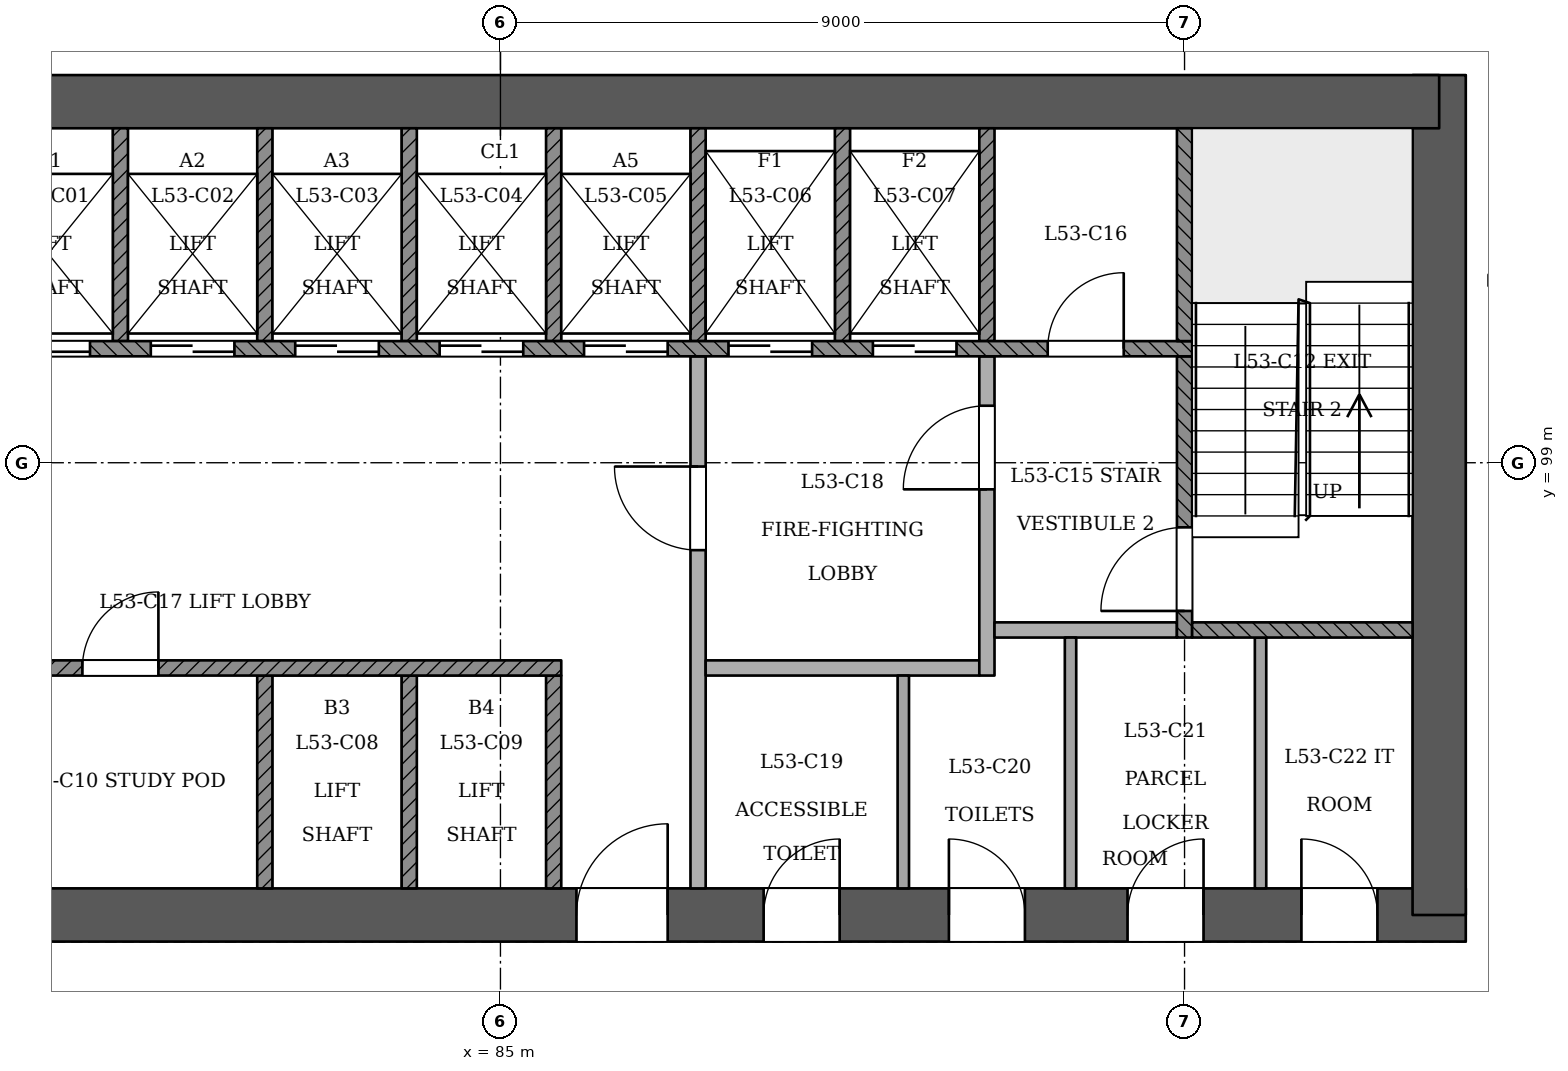
"""IFC4 building model, lengths in metres.
Left out: names, types, materials, properties, quantities, classifications, styles, units other than length and angle.
Written with IfcOpenShell. Run it as: python <this file> out.ifc"""

import sys

from ifc_helpers import new_model, si_unit, direction, frame, frame_2d, origin, place, context, subcontext, project, spatial, rectangle, extrude, element, fill, save


model = new_model("IFC4")
c1 = context("Model", 3, precision=1e-05, world=origin(), true_north=direction((0.0, 1.0)))
c2 = subcontext(c1, "Body", "Model", "MODEL_VIEW")
j1 = project(units=[si_unit("LENGTHUNIT", "METRE"), si_unit("PLANEANGLEUNIT", "RADIAN")], contexts=[c1])
p1 = place(None, origin())
s1 = spatial("IfcSite", under=j1, at=p1, CompositionType="ELEMENT")
p2 = place(p1, origin())
s2 = spatial("IfcBuilding", under=s1, at=p2, CompositionType="ELEMENT")
p3 = place(p2, frame((0.0, 0.0, 205.2)))
s3 = spatial("IfcBuildingStorey", under=s2, at=p3, CompositionType="ELEMENT", Elevation=205.2)
p4 = place(p3, frame((72.65, 93.05, 0.0), z_axis=(0.0, 0.0, 1.0), x_axis=(1.0, 0.0, 0.0)))
e1 = element("IfcWall", 1, at=p4, inside=s3, PredefinedType="SHEAR", context=c2, shape_type="SweptSolid", body=[
    extrude(rectangle(XDim=25.05, YDim=0.7, at=frame_2d((12.525, 0.0))), origin(), (0.0, 0.0, 1.0), 3.6),
])
p5 = place(p4, frame((1.15, 0.0, 0.0)))
e2 = element("IfcOpeningElement", 2, at=p5, cuts=e1, PredefinedType="OPENING", context=c2, shape_type="SweptSolid", body=[
    extrude(rectangle(XDim=1.2, YDim=2.1, at=frame_2d((0.6, 1.05))), frame((0.0, 0.36, 0.0), z_axis=(0.0, -1.0, 0.0), x_axis=(1.0, 0.0, 0.0)), (0.0, 0.0, 1.0), 0.721),
])
p6 = place(p4, frame((3.35, 0.0, 0.0)))
e3 = element("IfcOpeningElement", 3, at=p6, cuts=e1, PredefinedType="OPENING", context=c2, shape_type="SweptSolid", body=[
    extrude(rectangle(XDim=1.2, YDim=2.1, at=frame_2d((0.6, 1.05))), frame((0.0, 0.36, 0.0), z_axis=(0.0, -1.0, 0.0), x_axis=(1.0, 0.0, 0.0)), (0.0, 0.0, 1.0), 0.721),
])
p7 = place(p4, frame((13.35, 0.0, 0.0)))
e4 = element("IfcOpeningElement", 4, at=p7, cuts=e1, PredefinedType="OPENING", context=c2, shape_type="SweptSolid", body=[
    extrude(rectangle(XDim=1.2, YDim=2.1, at=frame_2d((0.6, 1.05))), frame((0.0, 0.36, 0.0), z_axis=(0.0, -1.0, 0.0), x_axis=(1.0, 0.0, 0.0)), (0.0, 0.0, 1.0), 0.721),
])
p8 = place(p4, frame((15.812, 0.0, 0.0)))
e5 = element("IfcOpeningElement", 5, at=p8, cuts=e1, PredefinedType="OPENING", context=c2, shape_type="SweptSolid", body=[
    extrude(rectangle(XDim=1.0, YDim=2.1, at=frame_2d((0.5, 1.05))), frame((0.0, 0.36, 0.0), z_axis=(0.0, -1.0, 0.0), x_axis=(1.0, 0.0, 0.0)), (0.0, 0.0, 1.0), 0.721),
])
p9 = place(p4, frame((18.25, 0.0, 0.0)))
e6 = element("IfcOpeningElement", 6, at=p9, cuts=e1, PredefinedType="OPENING", context=c2, shape_type="SweptSolid", body=[
    extrude(rectangle(XDim=1.0, YDim=2.1, at=frame_2d((0.5, 1.05))), frame((0.0, 0.36, 0.0), z_axis=(0.0, -1.0, 0.0), x_axis=(1.0, 0.0, 0.0)), (0.0, 0.0, 1.0), 0.721),
])
p10 = place(p4, frame((20.6, 0.0, 0.0)))
e7 = element("IfcOpeningElement", 7, at=p10, cuts=e1, PredefinedType="OPENING", context=c2, shape_type="SweptSolid", body=[
    extrude(rectangle(XDim=1.0, YDim=2.1, at=frame_2d((0.5, 1.05))), frame((0.0, 0.36, 0.0), z_axis=(0.0, -1.0, 0.0), x_axis=(1.0, 0.0, 0.0)), (0.0, 0.0, 1.0), 0.721),
])
p11 = place(p4, frame((22.887, 0.0, 0.0)))
e8 = element("IfcOpeningElement", 8, at=p11, cuts=e1, PredefinedType="OPENING", context=c2, shape_type="SweptSolid", body=[
    extrude(rectangle(XDim=1.0, YDim=2.1, at=frame_2d((0.5, 1.05))), frame((0.0, 0.36, 0.0), z_axis=(0.0, -1.0, 0.0), x_axis=(1.0, 0.0, 0.0)), (0.0, 0.0, 1.0), 0.721),
])
p12 = place(p3, frame((97.35, 93.05, 0.0), z_axis=(0.0, 0.0, 1.0), x_axis=(0.0, 1.0, 0.0)))
e9 = element("IfcWall", 9, at=p12, inside=s3, PredefinedType="SHEAR", context=c2, shape_type="SweptSolid", body=[
    extrude(rectangle(XDim=11.05, YDim=0.7, at=frame_2d((5.525, 0.0))), origin(), (0.0, 0.0, 1.0), 3.6),
])
p13 = place(p3, frame((97.35, 103.75, 0.0), z_axis=(0.0, 0.0, 1.0), x_axis=(-1.0, 0.0, 0.0)))
e10 = element("IfcWall", 10, at=p13, inside=s3, PredefinedType="SHEAR", context=c2, shape_type="SweptSolid", body=[
    extrude(rectangle(XDim=25.05, YDim=0.7, at=frame_2d((12.525, 0.0))), origin(), (0.0, 0.0, 1.0), 3.6),
])
for number, where, z_axis, x_axis in (
    (11, (81.9, 93.4, 0.0), (0.0, 0.0, 1.0), (0.0, 1.0, 0.0)),
    (12, (83.8, 93.4, 0.0), (0.0, 0.0, 1.0), (0.0, 1.0, 0.0)),
    (13, (85.7, 93.4, 0.0), (0.0, 0.0, 1.0), (0.0, 1.0, 0.0)),
):
    element("IfcWall", number, at=place(p3, frame(where, z_axis=z_axis, x_axis=x_axis)), inside=s3, PredefinedType="SOLIDWALL", context=c2, shape_type="SweptSolid", body=[
        extrude(rectangle(XDim=2.8, YDim=0.2, at=frame_2d((1.4, 0.0))), origin(), (0.0, 0.0, 1.0), 3.15),
    ])
p14 = place(p3, frame((87.6, 93.4, 0.0), z_axis=(0.0, 0.0, 1.0), x_axis=(0.0, 1.0, 0.0)))
e14 = element("IfcWall", 14, at=p14, inside=s3, PredefinedType="PARTITIONING", context=c2, shape_type="SweptSolid", body=[
    extrude(rectangle(XDim=7.0, YDim=0.2, at=frame_2d((3.5, 0.0))), origin(), (0.0, 0.0, 1.0), 3.15),
])
p15 = place(p14, frame((4.45, 0.0, 0.0)))
e15 = element("IfcOpeningElement", 15, at=p15, cuts=e14, PredefinedType="OPENING", context=c2, shape_type="SweptSolid", body=[
    extrude(rectangle(XDim=1.1, YDim=2.1, at=frame_2d((0.55, 1.05))), frame((0.0, 0.11, 0.0), z_axis=(0.0, -1.0, 0.0), x_axis=(1.0, 0.0, 0.0)), (0.0, 0.0, 1.0), 0.221),
])
p16 = place(p3, frame((90.3, 93.4, 0.0), z_axis=(0.0, 0.0, 1.0), x_axis=(0.0, 1.0, 0.0)))
e16 = element("IfcWall", 16, at=p16, inside=s3, PredefinedType="PARTITIONING", context=c2, shape_type="SweptSolid", body=[
    extrude(rectangle(XDim=2.8, YDim=0.15, at=frame_2d((1.4, 0.0))), origin(), (0.0, 0.0, 1.0), 3.15),
])
for number, where, z_axis, x_axis in (
    (17, (92.5, 93.4, 0.0), (0.0, 0.0, 1.0), (0.0, 1.0, 0.0)),
    (18, (95.0, 93.4, 0.0), (0.0, 0.0, 1.0), (0.0, 1.0, 0.0)),
):
    element("IfcWall", number, at=place(p3, frame(where, z_axis=z_axis, x_axis=x_axis)), inside=s3, PredefinedType="PARTITIONING", context=c2, shape_type="SweptSolid", body=[
        extrude(rectangle(XDim=3.3, YDim=0.15, at=frame_2d((1.65, 0.0))), origin(), (0.0, 0.0, 1.0), 3.15),
    ])
p17 = place(p3, frame((78.0, 96.3, 0.0), z_axis=(0.0, 0.0, 1.0), x_axis=(1.0, 0.0, 0.0)))
e19 = element("IfcWall", 19, at=p17, inside=s3, PredefinedType="SOLIDWALL", context=c2, shape_type="SweptSolid", body=[
    extrude(rectangle(XDim=7.8, YDim=0.2, at=frame_2d((3.9, 0.0))), origin(), (0.0, 0.0, 1.0), 3.15),
])
p18 = place(p17, frame((1.5, 0.0, 0.0)))
e20 = element("IfcOpeningElement", 20, at=p18, cuts=e19, PredefinedType="OPENING", context=c2, shape_type="SweptSolid", body=[
    extrude(rectangle(XDim=1.0, YDim=2.1, at=frame_2d((0.5, 1.05))), frame((0.0, 0.11, 0.0), z_axis=(0.0, -1.0, 0.0), x_axis=(1.0, 0.0, 0.0)), (0.0, 0.0, 1.0), 0.221),
])
p19 = place(p3, frame((87.7, 96.3, 0.0), z_axis=(0.0, 0.0, 1.0), x_axis=(1.0, 0.0, 0.0)))
e21 = element("IfcWall", 21, at=p19, inside=s3, PredefinedType="PARTITIONING", context=c2, shape_type="SweptSolid", body=[
    extrude(rectangle(XDim=3.6, YDim=0.2, at=frame_2d((1.8, 0.0))), origin(), (0.0, 0.0, 1.0), 3.15),
])
p20 = place(p3, frame((91.4, 96.2, 0.0), z_axis=(0.0, 0.0, 1.0), x_axis=(0.0, 1.0, 0.0)))
e22 = element("IfcWall", 22, at=p20, inside=s3, PredefinedType="PARTITIONING", context=c2, shape_type="SweptSolid", body=[
    extrude(rectangle(XDim=4.2, YDim=0.2, at=frame_2d((2.1, 0.0))), origin(), (0.0, 0.0, 1.0), 3.15),
])
p21 = place(p20, frame((2.45, 0.0, 0.0)))
e23 = element("IfcOpeningElement", 23, at=p21, cuts=e22, PredefinedType="OPENING", context=c2, shape_type="SweptSolid", body=[
    extrude(rectangle(XDim=1.1, YDim=2.1, at=frame_2d((0.55, 1.05))), frame((0.0, 0.11, 0.0), z_axis=(0.0, -1.0, 0.0), x_axis=(1.0, 0.0, 0.0)), (0.0, 0.0, 1.0), 0.221),
])
p22 = place(p3, frame((91.5, 96.8, 0.0), z_axis=(0.0, 0.0, 1.0), x_axis=(1.0, 0.0, 0.0)))
e24 = element("IfcWall", 24, at=p22, inside=s3, PredefinedType="PARTITIONING", context=c2, shape_type="SweptSolid", body=[
    extrude(rectangle(XDim=2.4, YDim=0.2, at=frame_2d((1.2, 0.0))), origin(), (0.0, 0.0, 1.0), 3.15),
])
p23 = place(p3, frame((94.0, 96.7, 0.0), z_axis=(0.0, 0.0, 1.0), x_axis=(0.0, 1.0, 0.0)))
e25 = element("IfcWall", 25, at=p23, inside=s3, PredefinedType="SOLIDWALL", context=c2, shape_type="SweptSolid", body=[
    extrude(rectangle(XDim=3.7, YDim=0.2, at=frame_2d((1.85, 0.0))), origin(), (0.0, 0.0, 1.0), 3.15),
])
p24 = place(p23, frame((0.35, 0.0, 0.0)))
e26 = element("IfcOpeningElement", 26, at=p24, cuts=e25, PredefinedType="OPENING", context=c2, shape_type="SweptSolid", body=[
    extrude(rectangle(XDim=1.1, YDim=2.1, at=frame_2d((0.55, 1.05))), frame((0.0, 0.11, 0.0), z_axis=(0.0, -1.0, 0.0), x_axis=(1.0, 0.0, 0.0)), (0.0, 0.0, 1.0), 0.221),
])
p25 = place(p3, frame((94.1, 96.8, 0.0), z_axis=(0.0, 0.0, 1.0), x_axis=(1.0, 0.0, 0.0)))
e27 = element("IfcWall", 27, at=p25, inside=s3, PredefinedType="SOLIDWALL", context=c2, shape_type="SweptSolid", body=[
    extrude(rectangle(XDim=2.9, YDim=0.2, at=frame_2d((1.45, 0.0))), origin(), (0.0, 0.0, 1.0), 3.15),
])
p26 = place(p3, frame((75.9, 100.5, 0.0), z_axis=(0.0, 0.0, 1.0), x_axis=(1.0, 0.0, 0.0)))
e28 = element("IfcWall", 28, at=p26, inside=s3, PredefinedType="SOLIDWALL", context=c2, shape_type="SweptSolid", body=[
    extrude(rectangle(XDim=18.2, YDim=0.2, at=frame_2d((9.1, 0.0))), origin(), (0.0, 0.0, 1.0), 3.15),
])
p27 = place(p26, frame((2.6, 0.0, 0.0)))
e29 = element("IfcOpeningElement", 29, at=p27, cuts=e28, PredefinedType="OPENING", context=c2, shape_type="SweptSolid", body=[
    extrude(rectangle(XDim=1.1, YDim=2.1, at=frame_2d((0.55, 1.05))), frame((0.0, 0.11, 0.0), z_axis=(0.0, -1.0, 0.0), x_axis=(1.0, 0.0, 0.0)), (0.0, 0.0, 1.0), 0.221),
])
p28 = place(p26, frame((4.5, 0.0, 0.0)))
e30 = element("IfcOpeningElement", 30, at=p28, cuts=e28, PredefinedType="OPENING", context=c2, shape_type="SweptSolid", body=[
    extrude(rectangle(XDim=1.1, YDim=2.1, at=frame_2d((0.55, 1.05))), frame((0.0, 0.11, 0.0), z_axis=(0.0, -1.0, 0.0), x_axis=(1.0, 0.0, 0.0)), (0.0, 0.0, 1.0), 0.221),
])
p29 = place(p26, frame((6.4, 0.0, 0.0)))
e31 = element("IfcOpeningElement", 31, at=p29, cuts=e28, PredefinedType="OPENING", context=c2, shape_type="SweptSolid", body=[
    extrude(rectangle(XDim=1.1, YDim=2.1, at=frame_2d((0.55, 1.05))), frame((0.0, 0.11, 0.0), z_axis=(0.0, -1.0, 0.0), x_axis=(1.0, 0.0, 0.0)), (0.0, 0.0, 1.0), 0.221),
])
p30 = place(p26, frame((8.3, 0.0, 0.0)))
e32 = element("IfcOpeningElement", 32, at=p30, cuts=e28, PredefinedType="OPENING", context=c2, shape_type="SweptSolid", body=[
    extrude(rectangle(XDim=1.1, YDim=2.1, at=frame_2d((0.55, 1.05))), frame((0.0, 0.11, 0.0), z_axis=(0.0, -1.0, 0.0), x_axis=(1.0, 0.0, 0.0)), (0.0, 0.0, 1.0), 0.221),
])
p31 = place(p26, frame((10.2, 0.0, 0.0)))
e33 = element("IfcOpeningElement", 33, at=p31, cuts=e28, PredefinedType="OPENING", context=c2, shape_type="SweptSolid", body=[
    extrude(rectangle(XDim=1.1, YDim=2.1, at=frame_2d((0.55, 1.05))), frame((0.0, 0.11, 0.0), z_axis=(0.0, -1.0, 0.0), x_axis=(1.0, 0.0, 0.0)), (0.0, 0.0, 1.0), 0.221),
])
p32 = place(p26, frame((12.1, 0.0, 0.0)))
e34 = element("IfcOpeningElement", 34, at=p32, cuts=e28, PredefinedType="OPENING", context=c2, shape_type="SweptSolid", body=[
    extrude(rectangle(XDim=1.1, YDim=2.1, at=frame_2d((0.55, 1.05))), frame((0.0, 0.11, 0.0), z_axis=(0.0, -1.0, 0.0), x_axis=(1.0, 0.0, 0.0)), (0.0, 0.0, 1.0), 0.221),
])
p33 = place(p26, frame((14.0, 0.0, 0.0)))
e35 = element("IfcOpeningElement", 35, at=p33, cuts=e28, PredefinedType="OPENING", context=c2, shape_type="SweptSolid", body=[
    extrude(rectangle(XDim=1.1, YDim=2.1, at=frame_2d((0.55, 1.05))), frame((0.0, 0.11, 0.0), z_axis=(0.0, -1.0, 0.0), x_axis=(1.0, 0.0, 0.0)), (0.0, 0.0, 1.0), 0.221),
])
p34 = place(p26, frame((0.65, 0.0, 0.0)))
e36 = element("IfcOpeningElement", 36, at=p34, cuts=e28, PredefinedType="OPENING", context=c2, shape_type="SweptSolid", body=[
    extrude(rectangle(XDim=1.0, YDim=2.1, at=frame_2d((0.5, 1.05))), frame((0.0, 0.11, 0.0), z_axis=(0.0, -1.0, 0.0), x_axis=(1.0, 0.0, 0.0)), (0.0, 0.0, 1.0), 0.221),
])
p35 = place(p26, frame((16.3, 0.0, 0.0)))
e37 = element("IfcOpeningElement", 37, at=p35, cuts=e28, PredefinedType="OPENING", context=c2, shape_type="SweptSolid", body=[
    extrude(rectangle(XDim=1.0, YDim=2.1, at=frame_2d((0.5, 1.05))), frame((0.0, 0.11, 0.0), z_axis=(0.0, -1.0, 0.0), x_axis=(1.0, 0.0, 0.0)), (0.0, 0.0, 1.0), 0.221),
])
for number, where, z_axis, x_axis in (
    (38, (80.0, 100.6, 0.0), (0.0, 0.0, 1.0), (0.0, 1.0, 0.0)),
    (39, (81.9, 100.6, 0.0), (0.0, 0.0, 1.0), (0.0, 1.0, 0.0)),
    (40, (83.8, 100.6, 0.0), (0.0, 0.0, 1.0), (0.0, 1.0, 0.0)),
    (41, (85.7, 100.6, 0.0), (0.0, 0.0, 1.0), (0.0, 1.0, 0.0)),
    (42, (87.6, 100.6, 0.0), (0.0, 0.0, 1.0), (0.0, 1.0, 0.0)),
    (43, (89.5, 100.6, 0.0), (0.0, 0.0, 1.0), (0.0, 1.0, 0.0)),
    (44, (91.4, 100.6, 0.0), (0.0, 0.0, 1.0), (0.0, 1.0, 0.0)),
    (45, (94.0, 100.6, 0.0), (0.0, 0.0, 1.0), (0.0, 1.0, 0.0)),
):
    element("IfcWall", number, at=place(p3, frame(where, z_axis=z_axis, x_axis=x_axis)), inside=s3, PredefinedType="SOLIDWALL", context=c2, shape_type="SweptSolid", body=[
        extrude(rectangle(XDim=2.8, YDim=0.2, at=frame_2d((1.4, 0.0))), origin(), (0.0, 0.0, 1.0), 3.15),
    ])
p36 = place(p27, origin())
e46 = element("IfcDoor", 46, at=p36, inside=s3, OperationType="SLIDING_TO_RIGHT", PredefinedType="NOTDEFINED", context=c2, shape_type="SweptSolid", body=[
    extrude(rectangle(XDim=1.1, YDim=2.1, at=frame_2d((0.55, 1.05))), frame((0.0, 0.025, 0.0), z_axis=(0.0, -1.0, 0.0), x_axis=(1.0, 0.0, 0.0)), (0.0, 0.0, 1.0), 0.05),
])
fill(e29, e46)
p37 = place(p28, origin())
e47 = element("IfcDoor", 47, at=p37, inside=s3, OperationType="SLIDING_TO_LEFT", PredefinedType="NOTDEFINED", context=c2, shape_type="SweptSolid", body=[
    extrude(rectangle(XDim=1.1, YDim=2.1, at=frame_2d((0.55, 1.05))), frame((0.0, 0.025, 0.0), z_axis=(0.0, -1.0, 0.0), x_axis=(1.0, 0.0, 0.0)), (0.0, 0.0, 1.0), 0.05),
])
fill(e30, e47)
p38 = place(p29, origin())
e48 = element("IfcDoor", 48, at=p38, inside=s3, OperationType="SLIDING_TO_RIGHT", PredefinedType="NOTDEFINED", context=c2, shape_type="SweptSolid", body=[
    extrude(rectangle(XDim=1.1, YDim=2.1, at=frame_2d((0.55, 1.05))), frame((0.0, 0.025, 0.0), z_axis=(0.0, -1.0, 0.0), x_axis=(1.0, 0.0, 0.0)), (0.0, 0.0, 1.0), 0.05),
])
fill(e31, e48)
p39 = place(p30, origin())
e49 = element("IfcDoor", 49, at=p39, inside=s3, OperationType="SLIDING_TO_LEFT", PredefinedType="NOTDEFINED", context=c2, shape_type="SweptSolid", body=[
    extrude(rectangle(XDim=1.1, YDim=2.1, at=frame_2d((0.55, 1.05))), frame((0.0, 0.025, 0.0), z_axis=(0.0, -1.0, 0.0), x_axis=(1.0, 0.0, 0.0)), (0.0, 0.0, 1.0), 0.05),
])
fill(e32, e49)
p40 = place(p31, origin())
e50 = element("IfcDoor", 50, at=p40, inside=s3, OperationType="SLIDING_TO_RIGHT", PredefinedType="NOTDEFINED", context=c2, shape_type="SweptSolid", body=[
    extrude(rectangle(XDim=1.1, YDim=2.1, at=frame_2d((0.55, 1.05))), frame((0.0, 0.025, 0.0), z_axis=(0.0, -1.0, 0.0), x_axis=(1.0, 0.0, 0.0)), (0.0, 0.0, 1.0), 0.05),
])
fill(e33, e50)
p41 = place(p32, origin())
e51 = element("IfcDoor", 51, at=p41, inside=s3, OperationType="SLIDING_TO_RIGHT", PredefinedType="NOTDEFINED", context=c2, shape_type="SweptSolid", body=[
    extrude(rectangle(XDim=1.1, YDim=2.1, at=frame_2d((0.55, 1.05))), frame((0.0, 0.025, 0.0), z_axis=(0.0, -1.0, 0.0), x_axis=(1.0, 0.0, 0.0)), (0.0, 0.0, 1.0), 0.05),
])
fill(e34, e51)
p42 = place(p33, origin())
e52 = element("IfcDoor", 52, at=p42, inside=s3, OperationType="SLIDING_TO_LEFT", PredefinedType="NOTDEFINED", context=c2, shape_type="SweptSolid", body=[
    extrude(rectangle(XDim=1.1, YDim=2.1, at=frame_2d((0.55, 1.05))), frame((0.0, 0.025, 0.0), z_axis=(0.0, -1.0, 0.0), x_axis=(1.0, 0.0, 0.0)), (0.0, 0.0, 1.0), 0.05),
])
fill(e35, e52)
p43 = place(p24, origin())
e53 = element("IfcDoor", 53, at=p43, inside=s3, OperationType="SINGLE_SWING_LEFT", PredefinedType="NOTDEFINED", context=c2, shape_type="SweptSolid", body=[
    extrude(rectangle(XDim=1.1, YDim=2.1, at=frame_2d((0.55, 1.05))), frame((0.0, 0.025, 0.0), z_axis=(0.0, -1.0, 0.0), x_axis=(1.0, 0.0, 0.0)), (0.0, 0.0, 1.0), 0.05),
])
fill(e26, e53)
p44 = place(p15, origin())
e54 = element("IfcDoor", 54, at=p44, inside=s3, OperationType="SINGLE_SWING_RIGHT", PredefinedType="NOTDEFINED", context=c2, shape_type="SweptSolid", body=[
    extrude(rectangle(XDim=1.1, YDim=2.1, at=frame_2d((0.55, 1.05))), frame((0.0, 0.025, 0.0), z_axis=(0.0, -1.0, 0.0), x_axis=(1.0, 0.0, 0.0)), (0.0, 0.0, 1.0), 0.05),
])
fill(e15, e54)
p45 = place(p21, origin())
e55 = element("IfcDoor", 55, at=p45, inside=s3, OperationType="SINGLE_SWING_LEFT", PredefinedType="NOTDEFINED", context=c2, shape_type="SweptSolid", body=[
    extrude(rectangle(XDim=1.1, YDim=2.1, at=frame_2d((0.55, 1.05))), frame((0.0, 0.025, 0.0), z_axis=(0.0, -1.0, 0.0), x_axis=(1.0, 0.0, 0.0)), (0.0, 0.0, 1.0), 0.05),
])
fill(e23, e55)
p46 = place(p7, origin())
e56 = element("IfcDoor", 56, at=p46, inside=s3, OperationType="SINGLE_SWING_RIGHT", PredefinedType="NOTDEFINED", context=c2, shape_type="SweptSolid", body=[
    extrude(rectangle(XDim=1.2, YDim=2.1, at=frame_2d((0.6, 1.05))), frame((0.0, 0.025, 0.0), z_axis=(0.0, -1.0, 0.0), x_axis=(1.0, 0.0, 0.0)), (0.0, 0.0, 1.0), 0.05),
])
fill(e4, e56)
p47 = place(p35, origin())
e57 = element("IfcDoor", 57, at=p47, inside=s3, OperationType="SINGLE_SWING_RIGHT", PredefinedType="NOTDEFINED", context=c2, shape_type="SweptSolid", body=[
    extrude(rectangle(XDim=1.0, YDim=2.1, at=frame_2d((0.5, 1.05))), frame((0.0, 0.025, 0.0), z_axis=(0.0, -1.0, 0.0), x_axis=(1.0, 0.0, 0.0)), (0.0, 0.0, 1.0), 0.05),
])
fill(e37, e57)
p48 = place(p8, origin())
e58 = element("IfcDoor", 58, at=p48, inside=s3, OperationType="SINGLE_SWING_RIGHT", PredefinedType="NOTDEFINED", context=c2, shape_type="SweptSolid", body=[
    extrude(rectangle(XDim=1.0, YDim=2.1, at=frame_2d((0.5, 1.05))), frame((0.0, 0.025, 0.0), z_axis=(0.0, -1.0, 0.0), x_axis=(1.0, 0.0, 0.0)), (0.0, 0.0, 1.0), 0.05),
])
fill(e5, e58)
p49 = place(p9, origin())
e59 = element("IfcDoor", 59, at=p49, inside=s3, OperationType="SINGLE_SWING_LEFT", PredefinedType="NOTDEFINED", context=c2, shape_type="SweptSolid", body=[
    extrude(rectangle(XDim=1.0, YDim=2.1, at=frame_2d((0.5, 1.05))), frame((0.0, 0.025, 0.0), z_axis=(0.0, -1.0, 0.0), x_axis=(1.0, 0.0, 0.0)), (0.0, 0.0, 1.0), 0.05),
])
fill(e6, e59)
p50 = place(p10, origin())
e60 = element("IfcDoor", 60, at=p50, inside=s3, OperationType="SINGLE_SWING_RIGHT", PredefinedType="NOTDEFINED", context=c2, shape_type="SweptSolid", body=[
    extrude(rectangle(XDim=1.0, YDim=2.1, at=frame_2d((0.5, 1.05))), frame((0.0, 0.025, 0.0), z_axis=(0.0, -1.0, 0.0), x_axis=(1.0, 0.0, 0.0)), (0.0, 0.0, 1.0), 0.05),
])
fill(e7, e60)
p51 = place(p11, origin())
e61 = element("IfcDoor", 61, at=p51, inside=s3, OperationType="SINGLE_SWING_LEFT", PredefinedType="NOTDEFINED", context=c2, shape_type="SweptSolid", body=[
    extrude(rectangle(XDim=1.0, YDim=2.1, at=frame_2d((0.5, 1.05))), frame((0.0, 0.025, 0.0), z_axis=(0.0, -1.0, 0.0), x_axis=(1.0, 0.0, 0.0)), (0.0, 0.0, 1.0), 0.05),
])
fill(e8, e61)
p52 = place(p18, origin())
e62 = element("IfcDoor", 62, at=p52, inside=s3, OperationType="SINGLE_SWING_RIGHT", PredefinedType="NOTDEFINED", context=c2, shape_type="SweptSolid", body=[
    extrude(rectangle(XDim=1.0, YDim=2.1, at=frame_2d((0.5, 1.05))), frame((0.0, 0.025, 0.0), z_axis=(0.0, -1.0, 0.0), x_axis=(1.0, 0.0, 0.0)), (0.0, 0.0, 1.0), 0.05),
])
fill(e20, e62)
save(model, sys.argv[1])
